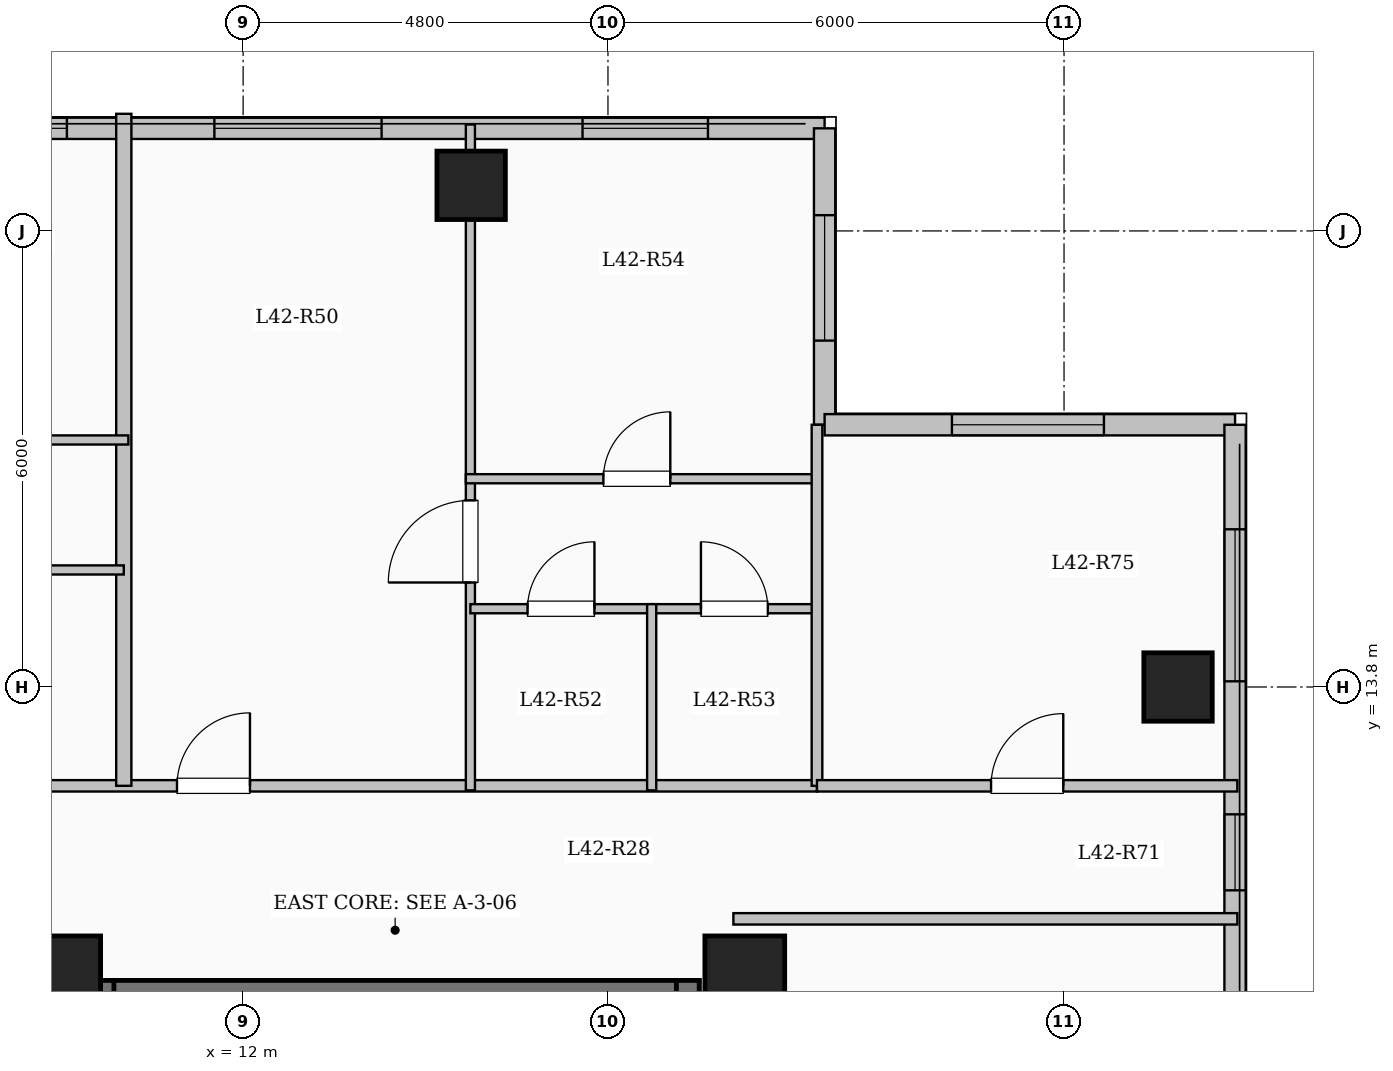
"""IFC4 building model, lengths in metres.
Left out: names, types, materials, properties, quantities, classifications, styles, units other than length and angle.
Written with IfcOpenShell. Run it as: python <this file> out.ifc"""

import sys

from ifc_helpers import new_model, si_unit, direction, frame, frame_2d, origin, origin_2d, place, context, subcontext, project, spatial, rectangle, extrude, element, fill, save


model = new_model("IFC4")
c1 = context("Model", 3, precision=1e-05, world=origin(), true_north=direction((0.0, 1.0)))
c2 = subcontext(c1, "Body", "Model", "MODEL_VIEW")
j1 = project(units=[si_unit("LENGTHUNIT", "METRE"), si_unit("PLANEANGLEUNIT", "RADIAN")], contexts=[c1])
p1 = place(None, origin())
s1 = spatial("IfcSite", under=j1, at=p1, CompositionType="ELEMENT")
p2 = place(p1, origin())
s2 = spatial("IfcBuilding", under=s1, at=p2, CompositionType="ELEMENT")
p3 = place(p2, frame((0.0, 0.0, 156.05)))
s3 = spatial("IfcBuildingStorey", under=s2, at=p3, CompositionType="ELEMENT", Elevation=156.05)
for number, where, z_axis, x_axis in (
    (1, (9.6, 10.0, 0.0), (0.0, 0.0, 1.0), (1.0, 0.0, 0.0)),
    (2, (18.6, 10.0, 0.0), (0.0, 0.0, 1.0), (1.0, 0.0, 0.0)),
):
    element("IfcColumn", number, at=place(p3, frame(where, z_axis=z_axis, x_axis=x_axis)), inside=s3, PredefinedType="COLUMN", context=c2, shape_type="SweptSolid", body=[
        extrude(rectangle(XDim=1.05, YDim=1.05, at=origin_2d()), origin(), (0.0, 0.0, 1.0), 3.35),
    ])
for number, where, z_axis, x_axis in (
    (3, (15.0, 20.4, 0.0), (0.0, 0.0, 1.0), (1.0, 0.0, 0.0)),
    (4, (24.3, 13.8, 0.0), (0.0, 0.0, 1.0), (1.0, 0.0, 0.0)),
):
    element("IfcColumn", number, at=place(p3, frame(where, z_axis=z_axis, x_axis=x_axis)), inside=s3, PredefinedType="COLUMN", context=c2, shape_type="SweptSolid", body=[
        extrude(rectangle(XDim=0.9, YDim=0.9, at=origin_2d()), origin(), (0.0, 0.0, 1.0), 3.35),
    ])
p4 = place(p3, frame((7.35, 21.15, 0.0), z_axis=(0.0, 0.0, 1.0), x_axis=(1.0, 0.0, 0.0)))
e5 = element("IfcWall", 5, at=p4, inside=s3, PredefinedType="SOLIDWALL", context=c2, shape_type="SweptSolid", body=[
    extrude(rectangle(XDim=12.3, YDim=0.28, at=frame_2d((6.15, 0.0))), origin(), (0.0, 0.0, 1.0), 3.1),
])
p5 = place(p4, frame((0.831, 0.0, 0.9)))
e6 = element("IfcOpeningElement", 6, at=p5, cuts=e5, PredefinedType="OPENING", context=c2, shape_type="SweptSolid", body=[
    extrude(rectangle(XDim=1.5, YDim=1.65, at=frame_2d((0.75, 0.825))), frame((0.0, 0.15, 0.0), z_axis=(0.0, -1.0, 0.0), x_axis=(1.0, 0.0, 0.0)), (0.0, 0.0, 1.0), 0.3),
])
p6 = place(p4, frame((4.272, 0.0, 0.9)))
e7 = element("IfcOpeningElement", 7, at=p6, cuts=e5, PredefinedType="OPENING", context=c2, shape_type="SweptSolid", body=[
    extrude(rectangle(XDim=2.2, YDim=1.75, at=frame_2d((1.1, 0.875))), frame((0.0, 0.15, 0.0), z_axis=(0.0, -1.0, 0.0), x_axis=(1.0, 0.0, 0.0)), (0.0, 0.0, 1.0), 0.3),
])
p7 = place(p4, frame((9.115, 0.0, 0.9)))
e8 = element("IfcOpeningElement", 8, at=p7, cuts=e5, PredefinedType="OPENING", context=c2, shape_type="SweptSolid", body=[
    extrude(rectangle(XDim=1.65, YDim=1.6, at=frame_2d((0.825, 0.8))), frame((0.0, 0.15, 0.0), z_axis=(0.0, -1.0, 0.0), x_axis=(1.0, 0.0, 0.0)), (0.0, 0.0, 1.0), 0.3),
])
p8 = place(p3, frame((19.65, 21.15, 0.0), z_axis=(0.0, 0.0, 1.0), x_axis=(0.0, -1.0, 0.0)))
e9 = element("IfcWall", 9, at=p8, inside=s3, PredefinedType="SOLIDWALL", context=c2, shape_type="SweptSolid", body=[
    extrude(rectangle(XDim=3.9, YDim=0.28, at=frame_2d((1.95, 0.0))), origin(), (0.0, 0.0, 1.0), 3.1),
])
p9 = place(p8, frame((1.143, 0.0, 0.9)))
e10 = element("IfcOpeningElement", 10, at=p9, cuts=e9, PredefinedType="OPENING", context=c2, shape_type="SweptSolid", body=[
    extrude(rectangle(XDim=1.65, YDim=1.6, at=frame_2d((0.825, 0.8))), frame((0.0, 0.15, 0.0), z_axis=(0.0, -1.0, 0.0), x_axis=(1.0, 0.0, 0.0)), (0.0, 0.0, 1.0), 0.3),
])
p10 = place(p3, frame((19.65, 17.25, 0.0), z_axis=(0.0, 0.0, 1.0), x_axis=(1.0, 0.0, 0.0)))
e11 = element("IfcWall", 11, at=p10, inside=s3, PredefinedType="SOLIDWALL", context=c2, shape_type="SweptSolid", body=[
    extrude(rectangle(XDim=5.4, YDim=0.28, at=frame_2d((2.7, 0.0))), origin(), (0.0, 0.0, 1.0), 3.1),
])
p11 = place(p10, frame((1.675, 0.0, 0.9)))
e12 = element("IfcOpeningElement", 12, at=p11, cuts=e11, PredefinedType="OPENING", context=c2, shape_type="SweptSolid", body=[
    extrude(rectangle(XDim=2.0, YDim=1.7, at=frame_2d((1.0, 0.85))), frame((0.0, 0.15, 0.0), z_axis=(0.0, -1.0, 0.0), x_axis=(1.0, 0.0, 0.0)), (0.0, 0.0, 1.0), 0.3),
])
p12 = place(p3, frame((25.05, 17.25, 0.0), z_axis=(0.0, 0.0, 1.0), x_axis=(0.0, -1.0, 0.0)))
e13 = element("IfcWall", 13, at=p12, inside=s3, PredefinedType="SOLIDWALL", context=c2, shape_type="SweptSolid", body=[
    extrude(rectangle(XDim=34.5, YDim=0.28, at=frame_2d((17.25, 0.0))), origin(), (0.0, 0.0, 1.0), 3.1),
])
p13 = place(p12, frame((1.375, 0.0, 0.9)))
e14 = element("IfcOpeningElement", 14, at=p13, cuts=e13, PredefinedType="OPENING", context=c2, shape_type="SweptSolid", body=[
    extrude(rectangle(XDim=2.0, YDim=1.7, at=frame_2d((1.0, 0.85))), frame((0.0, 0.15, 0.0), z_axis=(0.0, -1.0, 0.0), x_axis=(1.0, 0.0, 0.0)), (0.0, 0.0, 1.0), 0.3),
])
p14 = place(p12, frame((5.125, 0.0, 0.95)))
e15 = element("IfcOpeningElement", 15, at=p14, cuts=e13, PredefinedType="OPENING", context=c2, shape_type="SweptSolid", body=[
    extrude(rectangle(XDim=1.0, YDim=1.5, at=frame_2d((0.5, 0.75))), frame((0.0, 0.15, 0.0), z_axis=(0.0, -1.0, 0.0), x_axis=(1.0, 0.0, 0.0)), (0.0, 0.0, 1.0), 0.3),
])
p15 = place(p12, frame((14.5, 0.0, 0.9)))
e16 = element("IfcOpeningElement", 16, at=p15, cuts=e13, PredefinedType="OPENING", context=c2, shape_type="SweptSolid", body=[
    extrude(rectangle(XDim=2.0, YDim=1.7, at=frame_2d((1.0, 0.85))), frame((0.0, 0.15, 0.0), z_axis=(0.0, -1.0, 0.0), x_axis=(1.0, 0.0, 0.0)), (0.0, 0.0, 1.0), 0.3),
])
p16 = place(p12, frame((25.258, 0.0, 0.9)))
e17 = element("IfcOpeningElement", 17, at=p16, cuts=e13, PredefinedType="OPENING", context=c2, shape_type="SweptSolid", body=[
    extrude(rectangle(XDim=1.5, YDim=1.65, at=frame_2d((0.75, 0.825))), frame((0.0, 0.15, 0.0), z_axis=(0.0, -1.0, 0.0), x_axis=(1.0, 0.0, 0.0)), (0.0, 0.0, 1.0), 0.3),
])
p17 = place(p12, frame((29.95, 0.0, 0.9)))
e18 = element("IfcOpeningElement", 18, at=p17, cuts=e13, PredefinedType="OPENING", context=c2, shape_type="SweptSolid", body=[
    extrude(rectangle(XDim=2.2, YDim=1.75, at=frame_2d((1.1, 0.875))), frame((0.0, 0.15, 0.0), z_axis=(0.0, -1.0, 0.0), x_axis=(1.0, 0.0, 0.0)), (0.0, 0.0, 1.0), 0.3),
])
p18 = place(p3, frame((10.0, 9.79, 0.0), z_axis=(0.0, 0.0, 1.0), x_axis=(1.0, 0.0, 0.0)))
e19 = element("IfcWall", 19, at=p18, inside=s3, PredefinedType="SHEAR", context=c2, shape_type="SweptSolid", body=[
    extrude(rectangle(XDim=8.0, YDim=0.3, at=frame_2d((4.0, 0.0))), origin(), (0.0, 0.0, 1.0), 3.35),
])
for number, where, z_axis, x_axis in (
    (20, (10.15, 6.35, 0.0), (0.0, 0.0, 1.0), (0.0, 1.0, 0.0)),
    (21, (17.85, 6.35, 0.0), (0.0, 0.0, 1.0), (0.0, 1.0, 0.0)),
):
    element("IfcWall", number, at=place(p3, frame(where, z_axis=z_axis, x_axis=x_axis)), inside=s3, PredefinedType="SHEAR", context=c2, shape_type="SweptSolid", body=[
        extrude(rectangle(XDim=3.59, YDim=0.3, at=frame_2d((1.795, 0.0))), origin(), (0.0, 0.0, 1.0), 3.35),
    ])
p19 = place(p3, frame((3.85, 12.5, 0.0), z_axis=(0.0, 0.0, 1.0), x_axis=(1.0, 0.0, 0.0)))
e22 = element("IfcWall", 22, at=p19, inside=s3, PredefinedType="PARTITIONING", context=c2, shape_type="SweptSolid", body=[
    extrude(rectangle(XDim=15.7, YDim=0.15, at=frame_2d((7.85, 0.0))), origin(), (0.0, 0.0, 1.0), 3.1),
])
p20 = place(p19, frame((1.0, 0.0, 0.0)))
e23 = element("IfcOpeningElement", 23, at=p20, cuts=e22, PredefinedType="OPENING", context=c2, shape_type="SweptSolid", body=[
    extrude(rectangle(XDim=0.96, YDim=2.15, at=frame_2d((0.48, 1.075))), frame((0.0, 0.085, 0.0), z_axis=(0.0, -1.0, 0.0), x_axis=(1.0, 0.0, 0.0)), (0.0, 0.0, 1.0), 0.17),
])
p21 = place(p19, frame((7.28, 0.0, 0.0)))
e24 = element("IfcOpeningElement", 24, at=p21, cuts=e22, PredefinedType="OPENING", context=c2, shape_type="SweptSolid", body=[
    extrude(rectangle(XDim=0.96, YDim=2.15, at=frame_2d((0.48, 1.075))), frame((0.0, 0.085, 0.0), z_axis=(0.0, -1.0, 0.0), x_axis=(1.0, 0.0, 0.0)), (0.0, 0.0, 1.0), 0.17),
])
p22 = place(p3, frame((10.43, 12.5, 0.0), z_axis=(0.0, 0.0, 1.0), x_axis=(0.0, 1.0, 0.0)))
e25 = element("IfcWall", 25, at=p22, inside=s3, PredefinedType="SOLIDWALL", context=c2, shape_type="SweptSolid", body=[
    extrude(rectangle(XDim=8.841, YDim=0.2, at=frame_2d((4.42, 0.0))), origin(), (0.0, 0.0, 1.0), 3.1),
])
p23 = place(p3, frame((7.383, 15.34, 0.0), z_axis=(0.0, 0.0, 1.0), x_axis=(1.0, 0.0, 0.0)))
e26 = element("IfcWall", 26, at=p23, inside=s3, PredefinedType="PARTITIONING", context=c2, shape_type="SweptSolid", body=[
    extrude(rectangle(XDim=3.047, YDim=0.12, at=frame_2d((1.523, 0.0))), origin(), (0.0, 0.0, 1.0), 3.1),
])
p24 = place(p23, frame((1.083, 0.0, 0.0)))
e27 = element("IfcOpeningElement", 27, at=p24, cuts=e26, PredefinedType="OPENING", context=c2, shape_type="SweptSolid", body=[
    extrude(rectangle(XDim=0.88, YDim=2.1, at=frame_2d((0.44, 1.05))), frame((0.0, 0.07, 0.0), z_axis=(0.0, -1.0, 0.0), x_axis=(1.0, 0.0, 0.0)), (0.0, 0.0, 1.0), 0.14),
])
p25 = place(p3, frame((4.454, 17.05, 0.0), z_axis=(0.0, 0.0, 1.0), x_axis=(1.0, 0.0, 0.0)))
e28 = element("IfcWall", 28, at=p25, inside=s3, PredefinedType="PARTITIONING", context=c2, shape_type="SweptSolid", body=[
    extrude(rectangle(XDim=6.036, YDim=0.12, at=frame_2d((3.018, 0.0))), origin(), (0.0, 0.0, 1.0), 2.685),
])
p26 = place(p25, frame((1.024, 0.0, 0.0)))
e29 = element("IfcOpeningElement", 29, at=p26, cuts=e28, PredefinedType="OPENING", context=c2, shape_type="SweptSolid", body=[
    extrude(rectangle(XDim=0.88, YDim=2.1, at=frame_2d((0.44, 1.05))), frame((0.0, 0.07, 0.0), z_axis=(0.0, -1.0, 0.0), x_axis=(1.0, 0.0, 0.0)), (0.0, 0.0, 1.0), 0.14),
])
p27 = place(p25, frame((3.952, 0.0, 0.0)))
e30 = element("IfcOpeningElement", 30, at=p27, cuts=e28, PredefinedType="OPENING", context=c2, shape_type="SweptSolid", body=[
    extrude(rectangle(XDim=0.88, YDim=2.1, at=frame_2d((0.44, 1.05))), frame((0.0, 0.07, 0.0), z_axis=(0.0, -1.0, 0.0), x_axis=(1.0, 0.0, 0.0)), (0.0, 0.0, 1.0), 0.14),
])
p28 = place(p3, frame((14.99, 12.44, 0.0), z_axis=(0.0, 0.0, 1.0), x_axis=(0.0, 1.0, 0.0)))
e31 = element("IfcWall", 31, at=p28, inside=s3, PredefinedType="PARTITIONING", context=c2, shape_type="SweptSolid", body=[
    extrude(rectangle(XDim=8.76, YDim=0.12, at=frame_2d((4.38, 0.0))), origin(), (0.0, 0.0, 1.0), 2.585),
])
p29 = place(p28, frame((2.735, 0.0, 0.0)))
e32 = element("IfcOpeningElement", 32, at=p29, cuts=e31, PredefinedType="OPENING", context=c2, shape_type="SweptSolid", body=[
    extrude(rectangle(XDim=1.08, YDim=2.15, at=frame_2d((0.54, 1.075))), frame((0.0, 0.07, 0.0), z_axis=(0.0, -1.0, 0.0), x_axis=(1.0, 0.0, 0.0)), (0.0, 0.0, 1.0), 0.14),
])
p30 = place(p3, frame((14.99, 14.83, 0.0), z_axis=(0.0, 0.0, 1.0), x_axis=(1.0, 0.0, 0.0)))
e33 = element("IfcWall", 33, at=p30, inside=s3, PredefinedType="PARTITIONING", context=c2, shape_type="SweptSolid", body=[
    extrude(rectangle(XDim=2.385, YDim=0.12, at=frame_2d((1.192, 0.0))), origin(), (0.0, 0.0, 1.0), 3.1),
])
p31 = place(p30, frame((0.752, 0.0, 0.0)))
e34 = element("IfcOpeningElement", 34, at=p31, cuts=e33, PredefinedType="OPENING", context=c2, shape_type="SweptSolid", body=[
    extrude(rectangle(XDim=0.88, YDim=2.1, at=frame_2d((0.44, 1.05))), frame((0.0, 0.07, 0.0), z_axis=(0.0, -1.0, 0.0), x_axis=(1.0, 0.0, 0.0)), (0.0, 0.0, 1.0), 0.14),
])
p32 = place(p3, frame((17.375, 14.83, 0.0), z_axis=(0.0, 0.0, 1.0), x_axis=(1.0, 0.0, 0.0)))
e35 = element("IfcWall", 35, at=p32, inside=s3, PredefinedType="PARTITIONING", context=c2, shape_type="SweptSolid", body=[
    extrude(rectangle(XDim=2.175, YDim=0.12, at=frame_2d((1.087, 0.0))), origin(), (0.0, 0.0, 1.0), 3.1),
])
p33 = place(p32, frame((0.648, 0.0, 0.0)))
e36 = element("IfcOpeningElement", 36, at=p33, cuts=e35, PredefinedType="OPENING", context=c2, shape_type="SweptSolid", body=[
    extrude(rectangle(XDim=0.88, YDim=2.1, at=frame_2d((0.44, 1.05))), frame((0.0, 0.07, 0.0), z_axis=(0.0, -1.0, 0.0), x_axis=(1.0, 0.0, 0.0)), (0.0, 0.0, 1.0), 0.14),
])
p34 = place(p3, frame((14.93, 16.54, 0.0), z_axis=(0.0, 0.0, 1.0), x_axis=(1.0, 0.0, 0.0)))
e37 = element("IfcWall", 37, at=p34, inside=s3, PredefinedType="PARTITIONING", context=c2, shape_type="SweptSolid", body=[
    extrude(rectangle(XDim=4.68, YDim=0.12, at=frame_2d((2.34, 0.0))), origin(), (0.0, 0.0, 1.0), 3.1),
])
p35 = place(p34, frame((1.81, 0.0, 0.0)))
e38 = element("IfcOpeningElement", 38, at=p35, cuts=e37, PredefinedType="OPENING", context=c2, shape_type="SweptSolid", body=[
    extrude(rectangle(XDim=0.88, YDim=2.1, at=frame_2d((0.44, 1.05))), frame((0.0, 0.07, 0.0), z_axis=(0.0, -1.0, 0.0), x_axis=(1.0, 0.0, 0.0)), (0.0, 0.0, 1.0), 0.14),
])
p36 = place(p3, frame((17.375, 12.44, 0.0), z_axis=(0.0, 0.0, 1.0), x_axis=(0.0, 1.0, 0.0)))
e39 = element("IfcWall", 39, at=p36, inside=s3, PredefinedType="PARTITIONING", context=c2, shape_type="SweptSolid", body=[
    extrude(rectangle(XDim=2.45, YDim=0.12, at=frame_2d((1.225, 0.0))), origin(), (0.0, 0.0, 1.0), 3.1),
])
p37 = place(p3, frame((18.45, 10.75, 0.0), z_axis=(0.0, 0.0, 1.0), x_axis=(1.0, 0.0, 0.0)))
e40 = element("IfcWall", 40, at=p37, inside=s3, PredefinedType="PARTITIONING", context=c2, shape_type="SweptSolid", body=[
    extrude(rectangle(XDim=6.63, YDim=0.15, at=frame_2d((3.315, 0.0))), origin(), (0.0, 0.0, 1.0), 3.1),
])
p38 = place(p3, frame((19.55, 12.5, 0.0), z_axis=(0.0, 0.0, 1.0), x_axis=(0.0, 1.0, 0.0)))
e41 = element("IfcWall", 41, at=p38, inside=s3, PredefinedType="PARTITIONING", context=c2, shape_type="SweptSolid", body=[
    extrude(rectangle(XDim=4.75, YDim=0.14, at=frame_2d((2.375, 0.0))), origin(), (0.0, 0.0, 1.0), 3.1),
])
p39 = place(p3, frame((19.55, 12.5, 0.0), z_axis=(0.0, 0.0, 1.0), x_axis=(1.0, 0.0, 0.0)))
e42 = element("IfcWall", 42, at=p39, inside=s3, PredefinedType="PARTITIONING", context=c2, shape_type="SweptSolid", body=[
    extrude(rectangle(XDim=5.53, YDim=0.15, at=frame_2d((2.765, 0.0))), origin(), (0.0, 0.0, 1.0), 3.1),
])
p40 = place(p39, frame((2.29, 0.0, 0.0)))
e43 = element("IfcOpeningElement", 43, at=p40, cuts=e42, PredefinedType="OPENING", context=c2, shape_type="SweptSolid", body=[
    extrude(rectangle(XDim=0.95, YDim=2.15, at=frame_2d((0.475, 1.075))), frame((0.0, 0.085, 0.0), z_axis=(0.0, -1.0, 0.0), x_axis=(1.0, 0.0, 0.0)), (0.0, 0.0, 1.0), 0.17),
])
p41 = place(p5, origin())
e44 = element("IfcWindow", 44, at=p41, inside=s3, PartitioningType="SINGLE_PANEL", PredefinedType="WINDOW", context=c2, shape_type="SweptSolid", body=[
    extrude(rectangle(XDim=1.5, YDim=1.65, at=frame_2d((0.75, 0.825))), frame((0.0, 0.03, 0.0), z_axis=(0.0, -1.0, 0.0), x_axis=(1.0, 0.0, 0.0)), (0.0, 0.0, 1.0), 0.06),
])
fill(e6, e44)
p42 = place(p6, origin())
e45 = element("IfcWindow", 45, at=p42, inside=s3, PartitioningType="SINGLE_PANEL", PredefinedType="WINDOW", context=c2, shape_type="SweptSolid", body=[
    extrude(rectangle(XDim=2.2, YDim=1.75, at=frame_2d((1.1, 0.875))), frame((0.0, 0.03, 0.0), z_axis=(0.0, -1.0, 0.0), x_axis=(1.0, 0.0, 0.0)), (0.0, 0.0, 1.0), 0.06),
])
fill(e7, e45)
p43 = place(p7, origin())
e46 = element("IfcWindow", 46, at=p43, inside=s3, PartitioningType="SINGLE_PANEL", PredefinedType="WINDOW", context=c2, shape_type="SweptSolid", body=[
    extrude(rectangle(XDim=1.65, YDim=1.6, at=frame_2d((0.825, 0.8))), frame((0.0, 0.03, 0.0), z_axis=(0.0, -1.0, 0.0), x_axis=(1.0, 0.0, 0.0)), (0.0, 0.0, 1.0), 0.06),
])
fill(e8, e46)
p44 = place(p9, origin())
e47 = element("IfcWindow", 47, at=p44, inside=s3, PartitioningType="SINGLE_PANEL", PredefinedType="WINDOW", context=c2, shape_type="SweptSolid", body=[
    extrude(rectangle(XDim=1.65, YDim=1.6, at=frame_2d((0.825, 0.8))), frame((0.0, 0.03, 0.0), z_axis=(0.0, -1.0, 0.0), x_axis=(1.0, 0.0, 0.0)), (0.0, 0.0, 1.0), 0.06),
])
fill(e10, e47)
p45 = place(p11, origin())
e48 = element("IfcWindow", 48, at=p45, inside=s3, PartitioningType="SINGLE_PANEL", PredefinedType="WINDOW", context=c2, shape_type="SweptSolid", body=[
    extrude(rectangle(XDim=2.0, YDim=1.7, at=frame_2d((1.0, 0.85))), frame((0.0, 0.03, 0.0), z_axis=(0.0, -1.0, 0.0), x_axis=(1.0, 0.0, 0.0)), (0.0, 0.0, 1.0), 0.06),
])
fill(e12, e48)
p46 = place(p13, origin())
e49 = element("IfcWindow", 49, at=p46, inside=s3, PartitioningType="SINGLE_PANEL", PredefinedType="WINDOW", context=c2, shape_type="SweptSolid", body=[
    extrude(rectangle(XDim=2.0, YDim=1.7, at=frame_2d((1.0, 0.85))), frame((0.0, 0.03, 0.0), z_axis=(0.0, -1.0, 0.0), x_axis=(1.0, 0.0, 0.0)), (0.0, 0.0, 1.0), 0.06),
])
fill(e14, e49)
p47 = place(p14, origin())
e50 = element("IfcWindow", 50, at=p47, inside=s3, PartitioningType="SINGLE_PANEL", PredefinedType="WINDOW", context=c2, shape_type="SweptSolid", body=[
    extrude(rectangle(XDim=1.0, YDim=1.5, at=frame_2d((0.5, 0.75))), frame((0.0, 0.03, 0.0), z_axis=(0.0, -1.0, 0.0), x_axis=(1.0, 0.0, 0.0)), (0.0, 0.0, 1.0), 0.06),
])
fill(e15, e50)
p48 = place(p21, origin())
e51 = element("IfcDoor", 51, at=p48, inside=s3, OperationType="SINGLE_SWING_RIGHT", PredefinedType="DOOR", context=c2, shape_type="SweptSolid", body=[
    extrude(rectangle(XDim=0.96, YDim=2.15, at=frame_2d((0.48, 1.075))), frame((0.0, 0.025, 0.0), z_axis=(0.0, -1.0, 0.0), x_axis=(1.0, 0.0, 0.0)), (0.0, 0.0, 1.0), 0.05),
])
fill(e24, e51)
p49 = place(p29, origin())
e52 = element("IfcDoor", 52, at=p49, inside=s3, OperationType="SINGLE_SWING_LEFT", PredefinedType="DOOR", context=c2, shape_type="SweptSolid", body=[
    extrude(rectangle(XDim=1.08, YDim=2.15, at=frame_2d((0.54, 1.075))), frame((0.0, 0.025, 0.0), z_axis=(0.0, -1.0, 0.0), x_axis=(1.0, 0.0, 0.0)), (0.0, 0.0, 1.0), 0.05),
])
fill(e32, e52)
p50 = place(p31, origin())
e53 = element("IfcDoor", 53, at=p50, inside=s3, OperationType="SINGLE_SWING_RIGHT", PredefinedType="DOOR", context=c2, shape_type="SweptSolid", body=[
    extrude(rectangle(XDim=0.88, YDim=2.1, at=frame_2d((0.44, 1.05))), frame((0.0, 0.025, 0.0), z_axis=(0.0, -1.0, 0.0), x_axis=(1.0, 0.0, 0.0)), (0.0, 0.0, 1.0), 0.05),
])
fill(e34, e53)
p51 = place(p33, origin())
e54 = element("IfcDoor", 54, at=p51, inside=s3, OperationType="SINGLE_SWING_LEFT", PredefinedType="DOOR", context=c2, shape_type="SweptSolid", body=[
    extrude(rectangle(XDim=0.88, YDim=2.1, at=frame_2d((0.44, 1.05))), frame((0.0, 0.025, 0.0), z_axis=(0.0, -1.0, 0.0), x_axis=(1.0, 0.0, 0.0)), (0.0, 0.0, 1.0), 0.05),
])
fill(e36, e54)
p52 = place(p35, origin())
e55 = element("IfcDoor", 55, at=p52, inside=s3, OperationType="SINGLE_SWING_RIGHT", PredefinedType="DOOR", context=c2, shape_type="SweptSolid", body=[
    extrude(rectangle(XDim=0.88, YDim=2.1, at=frame_2d((0.44, 1.05))), frame((0.0, 0.025, 0.0), z_axis=(0.0, -1.0, 0.0), x_axis=(1.0, 0.0, 0.0)), (0.0, 0.0, 1.0), 0.05),
])
fill(e38, e55)
p53 = place(p40, origin())
e56 = element("IfcDoor", 56, at=p53, inside=s3, OperationType="SINGLE_SWING_RIGHT", PredefinedType="DOOR", context=c2, shape_type="SweptSolid", body=[
    extrude(rectangle(XDim=0.95, YDim=2.15, at=frame_2d((0.475, 1.075))), frame((0.0, 0.025, 0.0), z_axis=(0.0, -1.0, 0.0), x_axis=(1.0, 0.0, 0.0)), (0.0, 0.0, 1.0), 0.05),
])
fill(e43, e56)
save(model, sys.argv[1])
